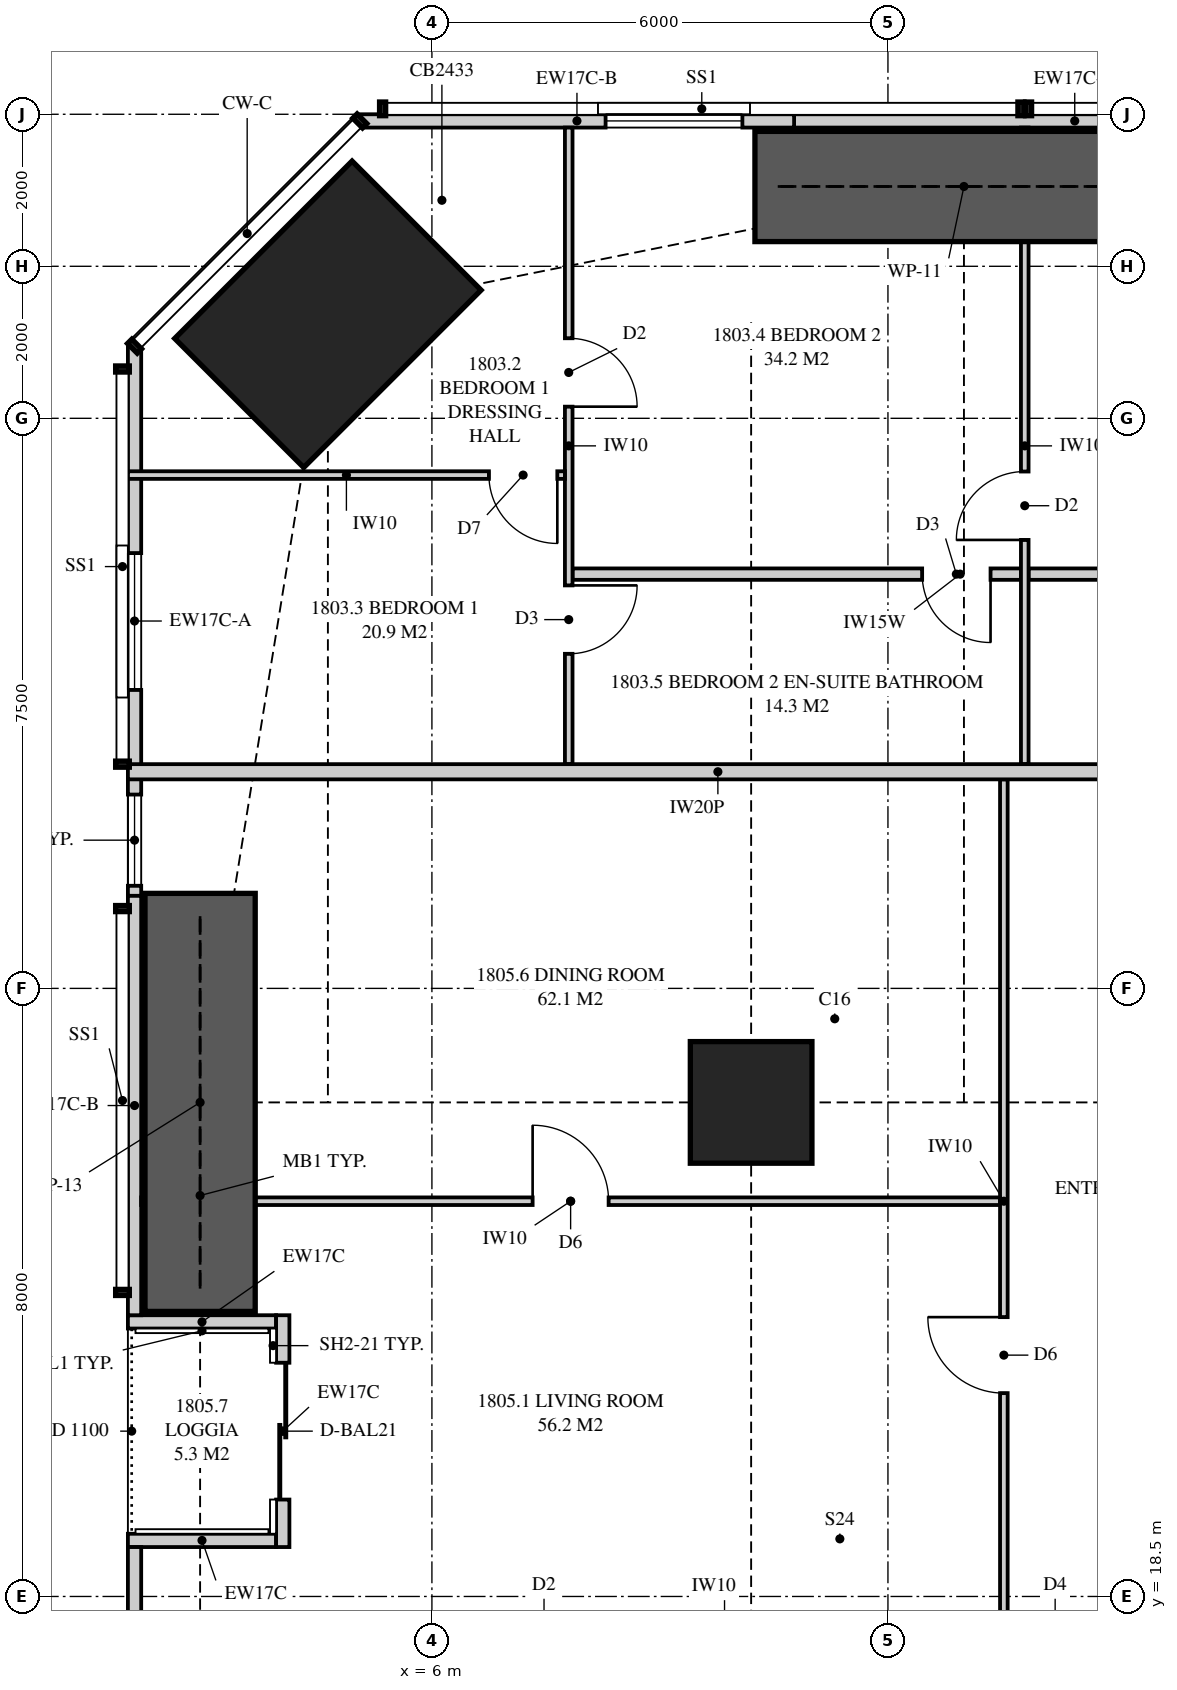
"""IFC4 building model, lengths in metres.
Left out: names, types, materials, properties, quantities, classifications, styles, units other than length and angle.
Written with IfcOpenShell. Run it as: python <this file> out.ifc"""

import sys

from ifc_helpers import new_model, si_unit, direction, frame, frame_2d, origin, origin_2d, place, context, subcontext, project, spatial, polyline, rectangle, hollow_rectangle, outline, extrude, element, fill, save


model = new_model("IFC4")
c1 = context("Model", 3, precision=1e-05, world=origin(), true_north=direction((0.0, 1.0)))
c2 = subcontext(c1, "Body", "Model", "MODEL_VIEW")
j1 = project(units=[si_unit("LENGTHUNIT", "METRE"), si_unit("PLANEANGLEUNIT", "RADIAN")], contexts=[c1])
p1 = place(None, origin())
s1 = spatial("IfcSite", under=j1, at=p1, CompositionType="ELEMENT")
p2 = place(p1, origin())
s2 = spatial("IfcBuilding", under=s1, at=p2, CompositionType="ELEMENT")
p3 = place(p2, frame((0.0, 0.0, 67.9)))
s3 = spatial("IfcBuildingStorey", under=s2, at=p3, CompositionType="ELEMENT", Elevation=67.9)
p4 = place(p3, frame((4.631, 35.369, 0.0), z_axis=(0.0, 0.0, 1.0), x_axis=(0.707106781187, -0.707106781187, 0.0)))
e1 = element("IfcColumn", 1, at=p4, inside=s3, PredefinedType="COLUMN", context=c2, shape_type="SweptSolid", body=[
    extrude(hollow_rectangle(XDim=2.4, YDim=3.3, WallThickness=0.125, at=origin_2d()), origin(), (0.0, 0.0, 1.0), 3.35),
])
p5 = place(p3, frame((10.2, 25.0, 0.0), z_axis=(0.0, 0.0, 1.0), x_axis=(1.0, 0.0, 0.0)))
e2 = element("IfcColumn", 2, at=p5, inside=s3, PredefinedType="COLUMN", context=c2, shape_type="SweptSolid", body=[
    extrude(rectangle(XDim=1.6, YDim=1.6, at=origin_2d()), origin(), (0.0, 0.0, 1.0), 3.35),
])
p6 = place(p3, frame((18.15, 37.913, 0.0), z_axis=(0.0, 0.0, 1.0), x_axis=(-1.0, 0.0, 0.0)))
e3 = element("IfcWall", 3, at=p6, inside=s3, PredefinedType="SOLIDWALL", context=c2, shape_type="SweptSolid", body=[
    extrude(rectangle(XDim=7.385, YDim=0.175, at=frame_2d((3.692, 0.0))), origin(), (0.0, 0.0, 1.0), 2.15),
])
p7 = place(p6, frame((0.492, 0.0, 0.4)))
e4 = element("IfcOpeningElement", 4, at=p7, cuts=e3, PredefinedType="OPENING", context=c2, shape_type="SweptSolid", body=[
    extrude(rectangle(XDim=1.8, YDim=1.7, at=frame_2d((0.9, 0.85))), frame((0.0, 0.097, 0.0), z_axis=(0.0, -1.0, 0.0), x_axis=(1.0, 0.0, 0.0)), (0.0, 0.0, 1.0), 0.195),
])
p8 = place(p3, frame((10.765, 37.913, 0.0), z_axis=(0.0, 0.0, 1.0), x_axis=(-1.0, 0.0, 0.0)))
e5 = element("IfcWall", 5, at=p8, inside=s3, PredefinedType="SOLIDWALL", context=c2, shape_type="SweptSolid", body=[
    extrude(rectangle(XDim=5.714, YDim=0.175, at=frame_2d((2.857, 0.0))), origin(), (0.0, 0.0, 1.0), 3.11),
])
p9 = place(p8, frame((0.68, 0.0, 0.4)))
e6 = element("IfcOpeningElement", 6, at=p9, cuts=e5, PredefinedType="OPENING", context=c2, shape_type="SweptSolid", body=[
    extrude(rectangle(XDim=1.8, YDim=1.7, at=frame_2d((0.9, 0.85))), frame((0.0, 0.097, 0.0), z_axis=(0.0, -1.0, 0.0), x_axis=(1.0, 0.0, 0.0)), (0.0, 0.0, 1.0), 0.195),
])
p10 = place(p3, frame((2.087, 34.949, 0.0), z_axis=(0.0, 0.0, 1.0), x_axis=(0.0, -1.0, 0.0)))
e7 = element("IfcWall", 7, at=p10, inside=s3, PredefinedType="SOLIDWALL", context=c2, shape_type="SweptSolid", body=[
    extrude(rectangle(XDim=7.231, YDim=0.175, at=frame_2d((3.616, 0.0))), origin(), (0.0, 0.0, 1.0), 3.11),
])
p11 = place(p10, frame((2.722, 0.0, 0.4)))
e8 = element("IfcOpeningElement", 8, at=p11, cuts=e7, PredefinedType="OPENING", context=c2, shape_type="SweptSolid", body=[
    extrude(rectangle(XDim=1.8, YDim=1.7, at=frame_2d((0.9, 0.85))), frame((0.0, 0.097, 0.0), z_axis=(0.0, -1.0, 0.0), x_axis=(1.0, 0.0, 0.0)), (0.0, 0.0, 1.0), 0.195),
])
p12 = place(p10, frame((5.899, 0.0, 0.4)))
e9 = element("IfcOpeningElement", 9, at=p12, cuts=e7, PredefinedType="OPENING", context=c2, shape_type="SweptSolid", body=[
    extrude(rectangle(XDim=1.2, YDim=1.7, at=frame_2d((0.6, 0.85))), frame((0.0, 0.097, 0.0), z_axis=(0.0, -1.0, 0.0), x_axis=(1.0, 0.0, 0.0)), (0.0, 0.0, 1.0), 0.195),
])
p13 = place(p3, frame((2.087, 27.718, 0.0), z_axis=(0.0, 0.0, 1.0), x_axis=(0.0, -1.0, 0.0)))
e10 = element("IfcWall", 10, at=p13, inside=s3, PredefinedType="SOLIDWALL", context=c2, shape_type="SweptSolid", body=[
    extrude(rectangle(XDim=5.518, YDim=0.175, at=frame_2d((2.759, 0.0))), origin(), (0.0, 0.0, 1.0), 2.15),
])
p14 = place(p3, frame((2.087, 19.15, 0.0), z_axis=(0.0, 0.0, 1.0), x_axis=(0.0, -1.0, 0.0)))
e11 = element("IfcWall", 11, at=p14, inside=s3, PredefinedType="SOLIDWALL", context=c2, shape_type="SweptSolid", body=[
    extrude(rectangle(XDim=8.867, YDim=0.175, at=frame_2d((4.434, 0.0))), origin(), (0.0, 0.0, 1.0), 2.15),
])
p15 = place(p14, frame((1.488, 0.0, 0.4)))
e12 = element("IfcOpeningElement", 12, at=p15, cuts=e11, PredefinedType="OPENING", context=c2, shape_type="SweptSolid", body=[
    extrude(rectangle(XDim=1.8, YDim=1.7, at=frame_2d((0.9, 0.85))), frame((0.0, 0.097, 0.0), z_axis=(0.0, -1.0, 0.0), x_axis=(1.0, 0.0, 0.0)), (0.0, 0.0, 1.0), 0.195),
])
p16 = place(p3, frame((4.038, 22.2, 0.0), z_axis=(0.0, 0.0, 1.0), x_axis=(0.0, -1.0, 0.0)))
e13 = element("IfcWall", 13, at=p16, inside=s3, PredefinedType="SOLIDWALL", context=c2, shape_type="SweptSolid", body=[
    extrude(rectangle(XDim=3.05, YDim=0.175, at=frame_2d((1.525, 0.0))), origin(), (0.0, 0.0, 1.0), 2.15),
])
p17 = place(p16, frame((0.625, 0.0, 0.0)))
e14 = element("IfcOpeningElement", 14, at=p17, cuts=e13, PredefinedType="OPENING", context=c2, shape_type="SweptSolid", body=[
    extrude(rectangle(XDim=1.8, YDim=2.1, at=frame_2d((0.9, 1.05))), frame((0.0, 0.097, 0.0), z_axis=(0.0, -1.0, 0.0), x_axis=(1.0, 0.0, 0.0)), (0.0, 0.0, 1.0), 0.195),
])
for number, where, z_axis, x_axis in (
    (15, (2.0, 22.113, 0.0), (0.0, 0.0, 1.0), (1.0, 0.0, 0.0)),
    (16, (2.0, 19.238, 0.0), (0.0, 0.0, 1.0), (1.0, 0.0, 0.0)),
):
    element("IfcWall", number, at=place(p3, frame(where, z_axis=z_axis, x_axis=x_axis)), inside=s3, PredefinedType="SOLIDWALL", context=c2, shape_type="SweptSolid", body=[
        extrude(rectangle(XDim=1.95, YDim=0.175, at=frame_2d((0.975, 0.0))), origin(), (0.0, 0.0, 1.0), 2.15),
    ])
p18 = place(p3, frame((7.8, 37.825, 0.0), z_axis=(0.0, 0.0, 1.0), x_axis=(0.0, -1.0, 0.0)))
e17 = element("IfcWall", 17, at=p18, inside=s3, PredefinedType="PARTITIONING", context=c2, shape_type="SweptSolid", body=[
    extrude(outline(polyline([(0.0, 0.0), (8.375, 0.0), (8.375, 3.11), (3.105, 3.11), (3.105, 2.15), (0.535, 2.15), (0.535, 3.11), (0.0, 3.11), (0.0, 0.0)])), frame((0.0, 0.05, 0.0), z_axis=(0.0, -1.0, 0.0), x_axis=(1.0, 0.0, 0.0)), (0.0, 0.0, 1.0), 0.1),
])
p19 = place(p18, frame((2.772, 0.0, 0.0)))
e18 = element("IfcOpeningElement", 18, at=p19, cuts=e17, PredefinedType="OPENING", context=c2, shape_type="SweptSolid", body=[
    extrude(rectangle(XDim=0.9, YDim=2.1, at=frame_2d((0.45, 1.05))), frame((0.0, 0.06, 0.0), z_axis=(0.0, -1.0, 0.0), x_axis=(1.0, 0.0, 0.0)), (0.0, 0.0, 1.0), 0.12),
])
p20 = place(p18, frame((6.023, 0.0, 0.0)))
e19 = element("IfcOpeningElement", 19, at=p20, cuts=e17, PredefinedType="OPENING", context=c2, shape_type="SweptSolid", body=[
    extrude(rectangle(XDim=0.9, YDim=2.1, at=frame_2d((0.45, 1.05))), frame((0.0, 0.06, 0.0), z_axis=(0.0, -1.0, 0.0), x_axis=(1.0, 0.0, 0.0)), (0.0, 0.0, 1.0), 0.12),
])
p21 = place(p3, frame((13.8, 37.825, 0.0), z_axis=(0.0, 0.0, 1.0), x_axis=(0.0, -1.0, 0.0)))
e20 = element("IfcWall", 20, at=p21, inside=s3, PredefinedType="PARTITIONING", context=c2, shape_type="SweptSolid", body=[
    extrude(outline(polyline([(2.035, 2.15), (0.0, 2.15), (0.0, 0.0), (8.375, 0.0), (8.375, 3.11), (2.035, 3.11), (2.035, 2.15)]), holes=[polyline([(1.021, 0.133), (0.529, 0.133), (0.529, 0.923), (1.021, 0.923), (1.021, 0.133)]), polyline([(1.021, 1.227), (0.529, 1.227), (0.529, 2.017), (1.021, 2.017), (1.021, 1.227)])]), frame((0.0, 0.05, 0.0), z_axis=(0.0, -1.0, 0.0), x_axis=(1.0, 0.0, 0.0)), (0.0, 0.0, 1.0), 0.1),
])
p22 = place(p21, frame((4.525, 0.0, 0.0)))
e21 = element("IfcOpeningElement", 21, at=p22, cuts=e20, PredefinedType="OPENING", context=c2, shape_type="SweptSolid", body=[
    extrude(rectangle(XDim=0.9, YDim=2.1, at=frame_2d((0.45, 1.05))), frame((0.0, 0.06, 0.0), z_axis=(0.0, -1.0, 0.0), x_axis=(1.0, 0.0, 0.0)), (0.0, 0.0, 1.0), 0.12),
])
p23 = place(p3, frame((2.0, 33.253, 0.0), z_axis=(0.0, 0.0, 1.0), x_axis=(1.0, 0.0, 0.0)))
e22 = element("IfcWall", 22, at=p23, inside=s3, PredefinedType="PARTITIONING", context=c2, shape_type="SweptSolid", body=[
    extrude(outline(polyline([(0.0, 0.0), (5.75, 0.0), (5.75, 3.11), (3.565, 3.11), (3.565, 2.15), (1.012, 2.15), (1.012, 3.11), (0.0, 3.11), (0.0, 0.0)])), frame((0.0, 0.05, 0.0), z_axis=(0.0, -1.0, 0.0), x_axis=(1.0, 0.0, 0.0)), (0.0, 0.0, 1.0), 0.1),
])
p24 = place(p23, frame((4.75, 0.0, 0.0)))
e23 = element("IfcOpeningElement", 23, at=p24, cuts=e22, PredefinedType="OPENING", context=c2, shape_type="SweptSolid", body=[
    extrude(rectangle(XDim=0.9, YDim=2.1, at=frame_2d((0.45, 1.05))), frame((0.0, 0.06, 0.0), z_axis=(0.0, -1.0, 0.0), x_axis=(1.0, 0.0, 0.0)), (0.0, 0.0, 1.0), 0.12),
])
p25 = place(p3, frame((7.85, 31.95, 0.0), z_axis=(0.0, 0.0, 1.0), x_axis=(1.0, 0.0, 0.0)))
e24 = element("IfcWall", 24, at=p25, inside=s3, PredefinedType="PLUMBINGWALL", context=c2, shape_type="SweptSolid", body=[
    extrude(outline(polyline([(0.0, 0.0), (5.9, 0.0), (5.9, 3.11), (5.462, 3.11), (5.462, 2.541), (4.838, 2.541), (4.838, 3.11), (3.635, 3.11), (3.635, 2.51), (1.065, 2.51), (1.065, 3.11), (0.0, 3.11), (0.0, 0.0)])), frame((0.0, 0.075, 0.0), z_axis=(0.0, -1.0, 0.0), x_axis=(1.0, 0.0, 0.0)), (0.0, 0.0, 1.0), 0.15),
])
p26 = place(p25, frame((4.6, 0.0, 0.0)))
e25 = element("IfcOpeningElement", 25, at=p26, cuts=e24, PredefinedType="OPENING", context=c2, shape_type="SweptSolid", body=[
    extrude(rectangle(XDim=0.9, YDim=2.1, at=frame_2d((0.45, 1.05))), frame((0.0, 0.085, 0.0), z_axis=(0.0, -1.0, 0.0), x_axis=(1.0, 0.0, 0.0)), (0.0, 0.0, 1.0), 0.17),
])
p27 = place(p3, frame((13.85, 31.95, 0.0), z_axis=(0.0, 0.0, 1.0), x_axis=(1.0, 0.0, 0.0)))
e26 = element("IfcWall", 26, at=p27, inside=s3, PredefinedType="PLUMBINGWALL", context=c2, shape_type="SweptSolid", body=[
    extrude(rectangle(XDim=4.2, YDim=0.15, at=frame_2d((2.1, 0.0))), origin(), (0.0, 0.0, 1.0), 3.11),
])
p28 = place(p3, frame((2.0, 29.35, 0.0), z_axis=(0.0, 0.0, 1.0), x_axis=(1.0, 0.0, 0.0)))
e27 = element("IfcWall", 27, at=p28, inside=s3, PredefinedType="PARTITIONING", context=c2, shape_type="SweptSolid", body=[
    extrude(outline(polyline([(0.0, 0.0), (15.525, 0.0), (15.525, 3.11), (11.337, 3.11), (11.337, 2.541), (10.663, 2.541), (10.663, 3.11), (9.51, 3.11), (9.51, 2.51), (6.89, 2.51), (6.89, 3.11), (2.982, 3.11), (2.982, 2.15), (0.328, 2.15), (0.328, 3.11), (0.0, 3.11), (0.0, 0.0)])), frame((0.0, 0.1, 0.0), z_axis=(0.0, -1.0, 0.0), x_axis=(1.0, 0.0, 0.0)), (0.0, 0.0, 1.0), 0.2),
])
p29 = place(p3, frame((13.525, 18.15, 0.0), z_axis=(0.0, 0.0, 1.0), x_axis=(0.0, 1.0, 0.0)))
e28 = element("IfcWall", 28, at=p29, inside=s3, PredefinedType="PARTITIONING", context=c2, shape_type="SweptSolid", body=[
    extrude(outline(polyline([(0.0, 0.0), (11.1, 0.0), (11.1, 3.11), (7.137, 3.11), (7.137, 2.541), (6.563, 2.541), (6.563, 3.11), (0.0, 3.11), (0.0, 0.0)])), frame((0.0, 0.05, 0.0), z_axis=(0.0, -1.0, 0.0), x_axis=(1.0, 0.0, 0.0)), (0.0, 0.0, 1.0), 0.1),
])
p30 = place(p29, frame((3.025, 0.0, 0.0)))
e29 = element("IfcOpeningElement", 29, at=p30, cuts=e28, PredefinedType="OPENING", context=c2, shape_type="SweptSolid", body=[
    extrude(rectangle(XDim=1.0, YDim=2.1, at=frame_2d((0.5, 1.05))), frame((0.0, 0.06, 0.0), z_axis=(0.0, -1.0, 0.0), x_axis=(1.0, 0.0, 0.0)), (0.0, 0.0, 1.0), 0.12),
])
p31 = place(p3, frame((2.175, 23.7, 0.0), z_axis=(0.0, 0.0, 1.0), x_axis=(1.0, 0.0, 0.0)))
e30 = element("IfcWall", 30, at=p31, inside=s3, PredefinedType="PARTITIONING", context=c2, shape_type="SweptSolid", body=[
    extrude(outline(polyline([(0.529, 2.15), (0.0, 2.15), (0.0, 0.0), (0.529, 0.0), (0.529, 0.581), (1.021, 0.581), (1.021, 0.0), (11.3, 0.0), (11.3, 3.11), (9.285, 3.11), (9.285, 2.51), (6.765, 2.51), (6.765, 3.11), (2.035, 3.11), (2.035, 2.15), (1.021, 2.15), (1.021, 1.569), (0.529, 1.569), (0.529, 2.15)])), frame((0.0, 0.05, 0.0), z_axis=(0.0, -1.0, 0.0), x_axis=(1.0, 0.0, 0.0)), (0.0, 0.0, 1.0), 0.1),
])
p32 = place(p31, frame((5.15, 0.0, 0.0)))
e31 = element("IfcOpeningElement", 31, at=p32, cuts=e30, PredefinedType="OPENING", context=c2, shape_type="SweptSolid", body=[
    extrude(rectangle(XDim=1.0, YDim=2.1, at=frame_2d((0.5, 1.05))), frame((0.0, 0.06, 0.0), z_axis=(0.0, -1.0, 0.0), x_axis=(1.0, 0.0, 0.0)), (0.0, 0.0, 1.0), 0.12),
])
for number, where, z_axis, x_axis in (
    (32, (10.25, 37.05, 0.0), (0.0, 0.0, 1.0), (1.0, 0.0, 0.0)),
    (33, (2.95, 22.25, 0.0), (0.0, 0.0, 1.0), (0.0, 1.0, 0.0)),
):
    element("IfcWall", number, at=place(p3, frame(where, z_axis=z_axis, x_axis=x_axis)), inside=s3, PredefinedType="SHEAR", context=c2, shape_type="SweptSolid", body=[
        extrude(rectangle(XDim=5.5, YDim=1.45, at=frame_2d((2.75, 0.0))), origin(), (0.0, 0.0, 1.0), 3.35),
    ])
p33 = place(p9, origin())
e34 = element("IfcWindow", 34, at=p33, inside=s3, PartitioningType="SINGLE_PANEL", PredefinedType="WINDOW", context=c2, shape_type="SweptSolid", body=[
    extrude(rectangle(XDim=1.8, YDim=1.7, at=frame_2d((0.9, 0.85))), frame((0.0, 0.03, 0.0), z_axis=(0.0, -1.0, 0.0), x_axis=(1.0, 0.0, 0.0)), (0.0, 0.0, 1.0), 0.06),
])
fill(e6, e34)
p34 = place(p11, origin())
e35 = element("IfcWindow", 35, at=p34, inside=s3, PartitioningType="SINGLE_PANEL", PredefinedType="WINDOW", context=c2, shape_type="SweptSolid", body=[
    extrude(rectangle(XDim=1.8, YDim=1.7, at=frame_2d((0.9, 0.85))), frame((0.0, 0.03, 0.0), z_axis=(0.0, -1.0, 0.0), x_axis=(1.0, 0.0, 0.0)), (0.0, 0.0, 1.0), 0.06),
])
fill(e8, e35)
p35 = place(p12, origin())
e36 = element("IfcWindow", 36, at=p35, inside=s3, PartitioningType="SINGLE_PANEL", PredefinedType="WINDOW", context=c2, shape_type="SweptSolid", body=[
    extrude(rectangle(XDim=1.2, YDim=1.7, at=frame_2d((0.6, 0.85))), frame((0.0, 0.03, 0.0), z_axis=(0.0, -1.0, 0.0), x_axis=(1.0, 0.0, 0.0)), (0.0, 0.0, 1.0), 0.06),
])
fill(e9, e36)
p36 = place(p17, origin())
e37 = element("IfcDoor", 37, at=p36, inside=s3, OperationType="SLIDING_TO_LEFT", PredefinedType="DOOR", context=c2, shape_type="SweptSolid", body=[
    extrude(rectangle(XDim=1.8, YDim=2.1, at=frame_2d((0.9, 1.05))), frame((0.0, 0.025, 0.0), z_axis=(0.0, -1.0, 0.0), x_axis=(1.0, 0.0, 0.0)), (0.0, 0.0, 1.0), 0.05),
])
fill(e14, e37)
p37 = place(p24, frame((0.9, 0.0, 0.0), z_axis=(0.0, 0.0, 1.0), x_axis=(-1.0, 0.0, 0.0)))
e38 = element("IfcDoor", 38, at=p37, inside=s3, OperationType="SINGLE_SWING_LEFT", PredefinedType="DOOR", context=c2, shape_type="SweptSolid", body=[
    extrude(rectangle(XDim=0.9, YDim=2.1, at=frame_2d((0.45, 1.05))), frame((0.0, 0.025, 0.0), z_axis=(0.0, -1.0, 0.0), x_axis=(1.0, 0.0, 0.0)), (0.0, 0.0, 1.0), 0.05),
])
fill(e23, e38)
p38 = place(p19, origin())
e39 = element("IfcDoor", 39, at=p38, inside=s3, OperationType="SINGLE_SWING_RIGHT", PredefinedType="DOOR", context=c2, shape_type="SweptSolid", body=[
    extrude(rectangle(XDim=0.9, YDim=2.1, at=frame_2d((0.45, 1.05))), frame((0.0, 0.025, 0.0), z_axis=(0.0, -1.0, 0.0), x_axis=(1.0, 0.0, 0.0)), (0.0, 0.0, 1.0), 0.05),
])
fill(e18, e39)
p39 = place(p22, frame((0.9, 0.0, 0.0), z_axis=(0.0, 0.0, 1.0), x_axis=(-1.0, 0.0, 0.0)))
e40 = element("IfcDoor", 40, at=p39, inside=s3, OperationType="SINGLE_SWING_LEFT", PredefinedType="DOOR", context=c2, shape_type="SweptSolid", body=[
    extrude(rectangle(XDim=0.9, YDim=2.1, at=frame_2d((0.45, 1.05))), frame((0.0, 0.025, 0.0), z_axis=(0.0, -1.0, 0.0), x_axis=(1.0, 0.0, 0.0)), (0.0, 0.0, 1.0), 0.05),
])
fill(e21, e40)
p40 = place(p26, frame((0.9, 0.0, 0.0), z_axis=(0.0, 0.0, 1.0), x_axis=(-1.0, 0.0, 0.0)))
e41 = element("IfcDoor", 41, at=p40, inside=s3, OperationType="SINGLE_SWING_LEFT", PredefinedType="DOOR", context=c2, shape_type="SweptSolid", body=[
    extrude(rectangle(XDim=0.9, YDim=2.1, at=frame_2d((0.45, 1.05))), frame((0.0, 0.025, 0.0), z_axis=(0.0, -1.0, 0.0), x_axis=(1.0, 0.0, 0.0)), (0.0, 0.0, 1.0), 0.05),
])
fill(e25, e41)
p41 = place(p20, origin())
e42 = element("IfcDoor", 42, at=p41, inside=s3, OperationType="SINGLE_SWING_LEFT", PredefinedType="DOOR", context=c2, shape_type="SweptSolid", body=[
    extrude(rectangle(XDim=0.9, YDim=2.1, at=frame_2d((0.45, 1.05))), frame((0.0, 0.025, 0.0), z_axis=(0.0, -1.0, 0.0), x_axis=(1.0, 0.0, 0.0)), (0.0, 0.0, 1.0), 0.05),
])
fill(e19, e42)
p42 = place(p30, origin())
e43 = element("IfcDoor", 43, at=p42, inside=s3, OperationType="SINGLE_SWING_RIGHT", PredefinedType="DOOR", context=c2, shape_type="SweptSolid", body=[
    extrude(rectangle(XDim=1.0, YDim=2.1, at=frame_2d((0.5, 1.05))), frame((0.0, 0.025, 0.0), z_axis=(0.0, -1.0, 0.0), x_axis=(1.0, 0.0, 0.0)), (0.0, 0.0, 1.0), 0.05),
])
fill(e29, e43)
p43 = place(p32, origin())
e44 = element("IfcDoor", 44, at=p43, inside=s3, OperationType="SINGLE_SWING_LEFT", PredefinedType="DOOR", context=c2, shape_type="SweptSolid", body=[
    extrude(rectangle(XDim=1.0, YDim=2.1, at=frame_2d((0.5, 1.05))), frame((0.0, 0.025, 0.0), z_axis=(0.0, -1.0, 0.0), x_axis=(1.0, 0.0, 0.0)), (0.0, 0.0, 1.0), 0.05),
])
fill(e31, e44)
save(model, sys.argv[1])
